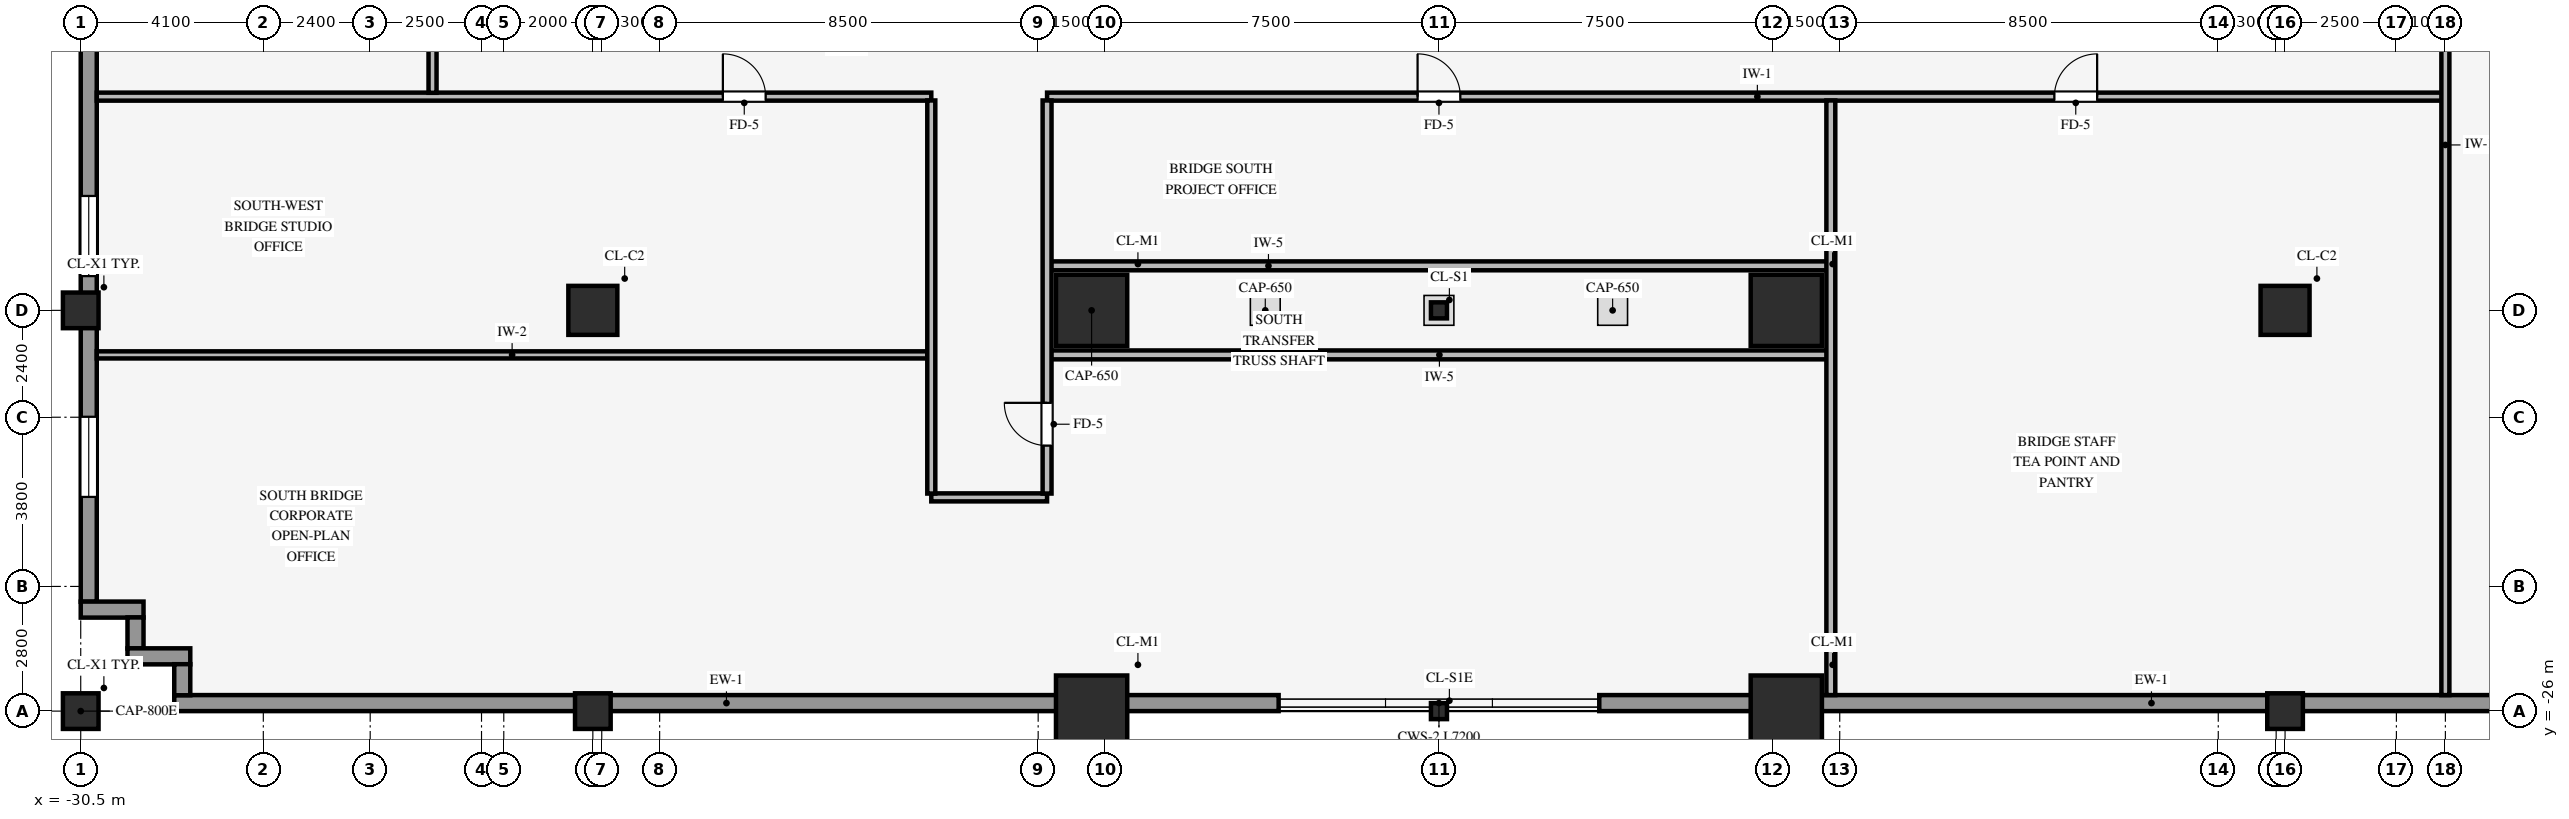
"""IFC4 building model, lengths in metres.
Left out: names, types, materials, properties, quantities, classifications, styles, units other than length and angle.
Written with IfcOpenShell. Run it as: python <this file> out.ifc"""

import sys

from ifc_helpers import new_model, si_unit, direction, frame, frame_2d, origin, origin_2d, place, context, subcontext, project, spatial, rectangle, hollow_rectangle, i_section, extrude, source, transform, mapped, element, fill, save


model = new_model("IFC4")
c1 = context("Model", 3, precision=1e-05, world=origin(), true_north=direction((0.0, 1.0)))
c2 = subcontext(c1, "Body", "Model", "MODEL_VIEW")
j1 = project(units=[si_unit("LENGTHUNIT", "METRE"), si_unit("PLANEANGLEUNIT", "RADIAN")], contexts=[c1])
p1 = place(None, origin())
s1 = spatial("IfcSite", under=j1, at=p1, CompositionType="ELEMENT")
p2 = place(p1, origin())
s2 = spatial("IfcBuilding", under=s1, at=p2, CompositionType="ELEMENT")
p3 = place(p2, frame((0.0, 0.0, 18.4)))
s3 = spatial("IfcBuildingStorey", under=s2, at=p3, CompositionType="ELEMENT", Elevation=18.4)
for number, where, z_axis, x_axis in (
    (1, (-7.8, -26.0, 0.0), (0.0, 0.0, 1.0), (1.0, 0.0, 0.0)),
    (2, (-7.8, -17.0, 0.0), (0.0, 0.0, 1.0), (1.0, 0.0, 0.0)),
    (3, (7.8, -26.0, 0.0), (0.0, 0.0, 1.0), (1.0, 0.0, 0.0)),
    (4, (7.8, -17.0, 0.0), (0.0, 0.0, 1.0), (1.0, 0.0, 0.0)),
):
    element("IfcColumn", number, at=place(p3, frame(where, z_axis=z_axis, x_axis=x_axis)), inside=s3, PredefinedType="COLUMN", context=c2, shape_type="SweptSolid", body=[
        extrude(rectangle(XDim=1.6, YDim=1.6, at=origin_2d()), origin(), (0.0, 0.0, 1.0), 4.2),
    ])
p4 = place(p3, frame((-30.5, -26.0, -0.4), z_axis=(0.0, 0.0, 1.0), x_axis=(1.0, 0.0, 0.0)))
e5 = element("IfcColumn", 5, at=p4, inside=s3, PredefinedType="COLUMN", context=c2, shape_type="SweptSolid", body=[
    extrude(hollow_rectangle(XDim=0.8, YDim=0.8, WallThickness=0.055, InnerFilletRadius=0.055, OuterFilletRadius=0.11, at=origin_2d()), origin(), (0.0, 0.0, 1.0), 4.6),
])
for number, where, z_axis, x_axis in (
    (6, (-30.5, -17.0, 0.0), (0.0, 0.0, 1.0), (1.0, 0.0, 0.0)),
    (7, (-19.0, -26.0, 0.0), (0.0, 0.0, 1.0), (1.0, 0.0, 0.0)),
):
    element("IfcColumn", number, at=place(p3, frame(where, z_axis=z_axis, x_axis=x_axis)), inside=s3, PredefinedType="COLUMN", context=c2, shape_type="SweptSolid", body=[
        extrude(hollow_rectangle(XDim=0.8, YDim=0.8, WallThickness=0.055, InnerFilletRadius=0.055, OuterFilletRadius=0.11, at=origin_2d()), origin(), (0.0, 0.0, 1.0), 4.2),
    ])
p5 = place(p3, frame((-19.0, -17.0, 0.0), z_axis=(0.0, 0.0, 1.0), x_axis=(1.0, 0.0, 0.0)))
e8 = element("IfcColumn", 8, at=p5, inside=s3, PredefinedType="COLUMN", context=c2, shape_type="SweptSolid", body=[
    extrude(rectangle(XDim=1.1, YDim=1.1, at=origin_2d()), origin(), (0.0, 0.0, 1.0), 4.2),
])
p6 = place(p3, frame((19.0, -26.0, 0.0), z_axis=(0.0, 0.0, 1.0), x_axis=(1.0, 0.0, 0.0)))
e9 = element("IfcColumn", 9, at=p6, inside=s3, PredefinedType="COLUMN", context=c2, shape_type="SweptSolid", body=[
    extrude(hollow_rectangle(XDim=0.8, YDim=0.8, WallThickness=0.055, InnerFilletRadius=0.055, OuterFilletRadius=0.11, at=origin_2d()), origin(), (0.0, 0.0, 1.0), 4.2),
])
p7 = place(p3, frame((19.0, -17.0, 0.0), z_axis=(0.0, 0.0, 1.0), x_axis=(1.0, 0.0, 0.0)))
e10 = element("IfcColumn", 10, at=p7, inside=s3, PredefinedType="COLUMN", context=c2, shape_type="SweptSolid", body=[
    extrude(rectangle(XDim=1.1, YDim=1.1, at=origin_2d()), origin(), (0.0, 0.0, 1.0), 4.2),
])
for number, where, z_axis, x_axis in (
    (11, (0.0, -26.0, -0.4), (0.0, 0.0, 1.0), (1.0, 0.0, 0.0)),
    (12, (0.0, -17.0, -0.4), (0.0, 0.0, 1.0), (1.0, 0.0, 0.0)),
):
    element("IfcColumn", number, at=place(p3, frame(where, z_axis=z_axis, x_axis=x_axis)), inside=s3, PredefinedType="COLUMN", context=c2, shape_type="SweptSolid", body=[
        extrude(i_section(OverallWidth=0.36, OverallDepth=0.36, WebThickness=0.021, FlangeThickness=0.021, FilletRadius=0.018, at=origin_2d()), origin(), (0.0, 0.0, 1.0), 4.6),
    ])
for number, where, z_axis, x_axis in (
    (13, (-28.4, -25.82, 0.0), (0.0, 0.0, 1.0), (1.0, 0.0, 0.0)),
    (14, (3.6, -25.82, 0.0), (0.0, 0.0, 1.0), (1.0, 0.0, 0.0)),
):
    element("IfcWall", number, at=place(p3, frame(where, z_axis=z_axis, x_axis=x_axis)), inside=s3, PredefinedType="STANDARD", context=c2, shape_type="SweptSolid", body=[
        extrude(rectangle(XDim=24.8, YDim=0.36, at=frame_2d((12.4, 0.0))), origin(), (0.0, 0.0, 1.0), 2.585),
    ])
p8 = place(p3, frame((-30.32, -23.544, 0.0), z_axis=(0.0, 0.0, 1.0), x_axis=(0.0, 1.0, 0.0)))
e15 = element("IfcWall", 15, at=p8, inside=s3, PredefinedType="STANDARD", context=c2, shape_type="SweptSolid", body=[
    extrude(rectangle(XDim=47.088, YDim=0.36, at=frame_2d((23.544, 0.0))), origin(), (0.0, 0.0, 1.0), 3.535),
])
p9 = place(p8, frame((2.354, 0.0, 0.85)))
e16 = element("IfcOpeningElement", 16, at=p9, cuts=e15, PredefinedType="OPENING", context=c2, shape_type="SweptSolid", body=[
    extrude(rectangle(XDim=1.8, YDim=2.35, at=frame_2d((0.9, 1.175))), frame((0.0, 0.19, 0.0), z_axis=(0.0, -1.0, 0.0), x_axis=(1.0, 0.0, 0.0)), (0.0, 0.0, 1.0), 0.38),
])
p10 = place(p8, frame((7.313, 0.0, 0.85)))
e17 = element("IfcOpeningElement", 17, at=p10, cuts=e15, PredefinedType="OPENING", context=c2, shape_type="SweptSolid", body=[
    extrude(rectangle(XDim=1.8, YDim=2.35, at=frame_2d((0.9, 1.175))), frame((0.0, 0.19, 0.0), z_axis=(0.0, -1.0, 0.0), x_axis=(1.0, 0.0, 0.0)), (0.0, 0.0, 1.0), 0.38),
])
p11 = place(p8, frame((15.881, 0.0, 0.85)))
e18 = element("IfcOpeningElement", 18, at=p11, cuts=e15, PredefinedType="OPENING", context=c2, shape_type="SweptSolid", body=[
    extrude(rectangle(XDim=1.8, YDim=2.35, at=frame_2d((0.9, 1.175))), frame((0.0, 0.19, 0.0), z_axis=(0.0, -1.0, 0.0), x_axis=(1.0, 0.0, 0.0)), (0.0, 0.0, 1.0), 0.38),
])
p12 = place(p8, frame((20.39, 0.0, 0.85)))
e19 = element("IfcOpeningElement", 19, at=p12, cuts=e15, PredefinedType="OPENING", context=c2, shape_type="SweptSolid", body=[
    extrude(rectangle(XDim=1.8, YDim=2.35, at=frame_2d((0.9, 1.175))), frame((0.0, 0.19, 0.0), z_axis=(0.0, -1.0, 0.0), x_axis=(1.0, 0.0, 0.0)), (0.0, 0.0, 1.0), 0.38),
])
p13 = place(p8, frame((24.898, 0.0, 0.85)))
e20 = element("IfcOpeningElement", 20, at=p13, cuts=e15, PredefinedType="OPENING", context=c2, shape_type="SweptSolid", body=[
    extrude(rectangle(XDim=1.8, YDim=2.35, at=frame_2d((0.9, 1.175))), frame((0.0, 0.19, 0.0), z_axis=(0.0, -1.0, 0.0), x_axis=(1.0, 0.0, 0.0)), (0.0, 0.0, 1.0), 0.38),
])
p14 = place(p8, frame((29.407, 0.0, 0.85)))
e21 = element("IfcOpeningElement", 21, at=p14, cuts=e15, PredefinedType="OPENING", context=c2, shape_type="SweptSolid", body=[
    extrude(rectangle(XDim=1.8, YDim=2.35, at=frame_2d((0.9, 1.175))), frame((0.0, 0.19, 0.0), z_axis=(0.0, -1.0, 0.0), x_axis=(1.0, 0.0, 0.0)), (0.0, 0.0, 1.0), 0.38),
])
p15 = place(p8, frame((37.975, 0.0, 0.85)))
e22 = element("IfcOpeningElement", 22, at=p15, cuts=e15, PredefinedType="OPENING", context=c2, shape_type="SweptSolid", body=[
    extrude(rectangle(XDim=1.8, YDim=2.35, at=frame_2d((0.9, 1.175))), frame((0.0, 0.19, 0.0), z_axis=(0.0, -1.0, 0.0), x_axis=(1.0, 0.0, 0.0)), (0.0, 0.0, 1.0), 0.38),
])
p16 = place(p8, frame((42.934, 0.0, 0.85)))
e23 = element("IfcOpeningElement", 23, at=p16, cuts=e15, PredefinedType="OPENING", context=c2, shape_type="SweptSolid", body=[
    extrude(rectangle(XDim=1.8, YDim=2.35, at=frame_2d((0.9, 1.175))), frame((0.0, 0.19, 0.0), z_axis=(0.0, -1.0, 0.0), x_axis=(1.0, 0.0, 0.0)), (0.0, 0.0, 1.0), 0.38),
])
p17 = place(p3, frame((-30.5, -23.72, 0.0), z_axis=(0.0, 0.0, 1.0), x_axis=(1.0, 0.0, 0.0)))
e24 = element("IfcWall", 24, at=p17, inside=s3, PredefinedType="STANDARD", context=c2, shape_type="SweptSolid", body=[
    extrude(rectangle(XDim=1.41, YDim=0.36, at=frame_2d((0.705, 0.0))), origin(), (0.0, 0.0, 1.0), 4.19),
])
p18 = place(p3, frame((-29.27, -24.594, 0.0), z_axis=(0.0, 0.0, 1.0), x_axis=(0.0, 1.0, 0.0)))
e25 = element("IfcWall", 25, at=p18, inside=s3, PredefinedType="STANDARD", context=c2, shape_type="SweptSolid", body=[
    extrude(rectangle(XDim=0.698, YDim=0.36, at=frame_2d((0.349, 0.0))), origin(), (0.0, 0.0, 1.0), 4.19),
])
p19 = place(p3, frame((-29.45, -24.77, 0.0), z_axis=(0.0, 0.0, 1.0), x_axis=(1.0, 0.0, 0.0)))
e26 = element("IfcWall", 26, at=p19, inside=s3, PredefinedType="STANDARD", context=c2, shape_type="SweptSolid", body=[
    extrude(rectangle(XDim=1.41, YDim=0.36, at=frame_2d((0.705, 0.0))), origin(), (0.0, 0.0, 1.0), 4.19),
])
p20 = place(p3, frame((-28.22, -25.644, 0.0), z_axis=(0.0, 0.0, 1.0), x_axis=(0.0, 1.0, 0.0)))
e27 = element("IfcWall", 27, at=p20, inside=s3, PredefinedType="STANDARD", context=c2, shape_type="SweptSolid", body=[
    extrude(rectangle(XDim=0.698, YDim=0.36, at=frame_2d((0.349, 0.0))), origin(), (0.0, 0.0, 1.0), 4.19),
])
p21 = place(p3, frame((-11.4, -21.2, 0.0), z_axis=(0.0, 0.0, 1.0), x_axis=(1.0, 0.0, 0.0)))
e28 = element("IfcWall", 28, at=p21, inside=s3, PredefinedType="PARTITIONING", context=c2, shape_type="SweptSolid", body=[
    extrude(rectangle(XDim=2.6, YDim=0.18, at=frame_2d((1.3, 0.0))), origin(), (0.0, 0.0, 1.0), 3.772),
])
p22 = place(p3, frame((-30.14, -18.0, 0.0), z_axis=(0.0, 0.0, 1.0), x_axis=(1.0, 0.0, 0.0)))
e29 = element("IfcWall", 29, at=p22, inside=s3, PredefinedType="PARTITIONING", context=c2, shape_type="SweptSolid", body=[
    extrude(rectangle(XDim=18.654, YDim=0.16, at=frame_2d((9.327, 0.0))), origin(), (0.0, 0.0, 1.0), 4.19),
])
for number, where, z_axis, x_axis in (
    (30, (-8.714, -18.0, 0.0), (0.0, 0.0, 1.0), (1.0, 0.0, 0.0)),
    (31, (-8.714, -16.0, 0.0), (0.0, 0.0, 1.0), (1.0, 0.0, 0.0)),
):
    element("IfcWall", number, at=place(p3, frame(where, z_axis=z_axis, x_axis=x_axis)), inside=s3, PredefinedType="STANDARD", context=c2, shape_type="SweptSolid", body=[
        extrude(rectangle(XDim=17.448, YDim=0.2, at=frame_2d((8.724, 0.0))), origin(), (0.0, 0.0, 1.0), 4.19),
    ])
p23 = place(p3, frame((-30.14, -12.2, 0.0), z_axis=(0.0, 0.0, 1.0), x_axis=(1.0, 0.0, 0.0)))
e32 = element("IfcWall", 32, at=p23, inside=s3, PredefinedType="PARTITIONING", context=c2, shape_type="SweptSolid", body=[
    extrude(rectangle(XDim=18.74, YDim=0.18, at=frame_2d((9.37, 0.0))), origin(), (0.0, 0.0, 1.0), 4.19),
])
p24 = place(p23, frame((14.06, 0.0, 0.0)))
e33 = element("IfcOpeningElement", 33, at=p24, cuts=e32, PredefinedType="OPENING", context=c2, shape_type="SweptSolid", body=[
    extrude(rectangle(XDim=0.96, YDim=2.1, at=frame_2d((0.48, 1.05))), frame((0.0, 0.1, 0.0), z_axis=(0.0, -1.0, 0.0), x_axis=(1.0, 0.0, 0.0)), (0.0, 0.0, 1.0), 0.2),
])
p25 = place(p3, frame((-8.8, -12.2, 0.0), z_axis=(0.0, 0.0, 1.0), x_axis=(1.0, 0.0, 0.0)))
e34 = element("IfcWall", 34, at=p25, inside=s3, PredefinedType="PARTITIONING", context=c2, shape_type="SweptSolid", body=[
    extrude(rectangle(XDim=31.334, YDim=0.18, at=frame_2d((15.667, 0.0))), origin(), (0.0, 0.0, 1.0), 4.19),
])
p26 = place(p25, frame((8.32, 0.0, 0.0)))
e35 = element("IfcOpeningElement", 35, at=p26, cuts=e34, PredefinedType="OPENING", context=c2, shape_type="SweptSolid", body=[
    extrude(rectangle(XDim=0.96, YDim=2.1, at=frame_2d((0.48, 1.05))), frame((0.0, 0.1, 0.0), z_axis=(0.0, -1.0, 0.0), x_axis=(1.0, 0.0, 0.0)), (0.0, 0.0, 1.0), 0.2),
])
p27 = place(p25, frame((22.62, 0.0, 0.0)))
e36 = element("IfcOpeningElement", 36, at=p27, cuts=e34, PredefinedType="OPENING", context=c2, shape_type="SweptSolid", body=[
    extrude(rectangle(XDim=0.96, YDim=2.1, at=frame_2d((0.48, 1.05))), frame((0.0, 0.1, 0.0), z_axis=(0.0, -1.0, 0.0), x_axis=(1.0, 0.0, 0.0)), (0.0, 0.0, 1.0), 0.2),
])
p28 = place(p3, frame((-22.6, -12.114, 0.0), z_axis=(0.0, 0.0, 1.0), x_axis=(0.0, 1.0, 0.0)))
e37 = element("IfcWall", 37, at=p28, inside=s3, PredefinedType="PARTITIONING", context=c2, shape_type="SweptSolid", body=[
    extrude(rectangle(XDim=24.228, YDim=0.18, at=frame_2d((12.114, 0.0))), origin(), (0.0, 0.0, 1.0), 4.19),
])
p29 = place(p28, frame((11.634, 0.0, 0.0)))
e38 = element("IfcOpeningElement", 38, at=p29, cuts=e37, PredefinedType="OPENING", context=c2, shape_type="SweptSolid", body=[
    extrude(rectangle(XDim=0.96, YDim=2.1, at=frame_2d((0.48, 1.05))), frame((0.0, 0.1, 0.0), z_axis=(0.0, -1.0, 0.0), x_axis=(1.0, 0.0, 0.0)), (0.0, 0.0, 1.0), 0.2),
])
p30 = place(p3, frame((-11.4, -21.114, 0.0), z_axis=(0.0, 0.0, 1.0), x_axis=(0.0, 1.0, 0.0)))
e39 = element("IfcWall", 39, at=p30, inside=s3, PredefinedType="PARTITIONING", context=c2, shape_type="SweptSolid", body=[
    extrude(rectangle(XDim=8.828, YDim=0.18, at=frame_2d((4.414, 0.0))), origin(), (0.0, 0.0, 1.0), 4.19),
])
p31 = place(p3, frame((-8.8, -21.114, 0.0), z_axis=(0.0, 0.0, 1.0), x_axis=(0.0, 1.0, 0.0)))
e40 = element("IfcWall", 40, at=p31, inside=s3, PredefinedType="STANDARD", context=c2, shape_type="SweptSolid", body=[
    extrude(rectangle(XDim=8.828, YDim=0.2, at=frame_2d((4.414, 0.0))), origin(), (0.0, 0.0, 1.0), 4.19),
])
p32 = place(p31, frame((1.077, 0.0, 0.0)))
e41 = element("IfcOpeningElement", 41, at=p32, cuts=e40, PredefinedType="OPENING", context=c2, shape_type="SweptSolid", body=[
    extrude(rectangle(XDim=0.96, YDim=2.1, at=frame_2d((0.48, 1.05))), frame((0.0, 0.11, 0.0), z_axis=(0.0, -1.0, 0.0), x_axis=(1.0, 0.0, 0.0)), (0.0, 0.0, 1.0), 0.22),
])
p33 = place(p3, frame((8.8, -25.64, 0.0), z_axis=(0.0, 0.0, 1.0), x_axis=(0.0, 1.0, 0.0)))
e42 = element("IfcWall", 42, at=p33, inside=s3, PredefinedType="STANDARD", context=c2, shape_type="SweptSolid", body=[
    extrude(rectangle(XDim=13.354, YDim=0.2, at=frame_2d((6.677, 0.0))), origin(), (0.0, 0.0, 1.0), 4.19),
])
p34 = place(p3, frame((22.6, -25.64, 0.0), z_axis=(0.0, 0.0, 1.0), x_axis=(0.0, 1.0, 0.0)))
e43 = element("IfcWall", 43, at=p34, inside=s3, PredefinedType="PARTITIONING", context=c2, shape_type="SweptSolid", body=[
    extrude(rectangle(XDim=51.28, YDim=0.18, at=frame_2d((25.64, 0.0))), origin(), (0.0, 0.0, 1.0), 4.19),
])
p35 = place(p34, frame((25.16, 0.0, 0.0)))
e44 = element("IfcOpeningElement", 44, at=p35, cuts=e43, PredefinedType="OPENING", context=c2, shape_type="SweptSolid", body=[
    extrude(rectangle(XDim=0.96, YDim=2.1, at=frame_2d((0.48, 1.05))), frame((0.0, 0.1, 0.0), z_axis=(0.0, -1.0, 0.0), x_axis=(1.0, 0.0, 0.0)), (0.0, 0.0, 1.0), 0.2),
])
p36 = place(p34, frame((43.09, 0.0, 0.0)))
e45 = element("IfcOpeningElement", 45, at=p36, cuts=e43, PredefinedType="OPENING", context=c2, shape_type="SweptSolid", body=[
    extrude(rectangle(XDim=0.9, YDim=2.1, at=frame_2d((0.45, 1.05))), frame((0.0, 0.1, 0.0), z_axis=(0.0, -1.0, 0.0), x_axis=(1.0, 0.0, 0.0)), (0.0, 0.0, 1.0), 0.2),
])
p37 = place(p34, frame((38.89, 0.0, 0.0)))
e46 = element("IfcOpeningElement", 46, at=p37, cuts=e43, PredefinedType="OPENING", context=c2, shape_type="SweptSolid", body=[
    extrude(rectangle(XDim=0.9, YDim=2.1, at=frame_2d((0.45, 1.05))), frame((0.0, 0.1, 0.0), z_axis=(0.0, -1.0, 0.0), x_axis=(1.0, 0.0, 0.0)), (0.0, 0.0, 1.0), 0.2),
])
p38 = place(p34, frame((47.29, 0.0, 0.0)))
e47 = element("IfcOpeningElement", 47, at=p38, cuts=e43, PredefinedType="OPENING", context=c2, shape_type="SweptSolid", body=[
    extrude(rectangle(XDim=0.9, YDim=2.1, at=frame_2d((0.45, 1.05))), frame((0.0, 0.1, 0.0), z_axis=(0.0, -1.0, 0.0), x_axis=(1.0, 0.0, 0.0)), (0.0, 0.0, 1.0), 0.2),
])
m1 = source(origin(), c2, "Body", "SweptSolid", [
    extrude(rectangle(XDim=1.8, YDim=2.35, at=frame_2d((0.9, 1.175))), frame((0.0, 0.03, 0.0), z_axis=(0.0, -1.0, 0.0), x_axis=(1.0, 0.0, 0.0)), (0.0, 0.0, 1.0), 0.06),
])
p39 = place(p9, origin())
e48 = element("IfcWindow", 48, at=p39, inside=s3, PartitioningType="SINGLE_PANEL", PredefinedType="WINDOW", context=c2, shape_type="MappedRepresentation", body=[
    mapped(m1, transform((0.0, 0.0, 0.0), scale=1.0)),
])
fill(e16, e48)
p40 = place(p10, origin())
e49 = element("IfcWindow", 49, at=p40, inside=s3, PartitioningType="SINGLE_PANEL", PredefinedType="WINDOW", context=c2, shape_type="MappedRepresentation", body=[
    mapped(m1, transform((0.0, 0.0, 0.0), scale=1.0)),
])
fill(e17, e49)
m2 = source(origin(), c2, "Body", "SweptSolid", [
    extrude(rectangle(XDim=0.96, YDim=2.1, at=frame_2d((0.48, 1.05))), frame((0.0, 0.025, 0.0), z_axis=(0.0, -1.0, 0.0), x_axis=(1.0, 0.0, 0.0)), (0.0, 0.0, 1.0), 0.05),
])
p41 = place(p26, origin())
e50 = element("IfcDoor", 50, at=p41, inside=s3, OperationType="SINGLE_SWING_LEFT", PredefinedType="DOOR", context=c2, shape_type="MappedRepresentation", body=[
    mapped(m2, transform((0.0, 0.0, 0.0), scale=1.0)),
])
fill(e35, e50)
p42 = place(p27, origin())
e51 = element("IfcDoor", 51, at=p42, inside=s3, OperationType="SINGLE_SWING_RIGHT", PredefinedType="DOOR", context=c2, shape_type="MappedRepresentation", body=[
    mapped(m2, transform((0.0, 0.0, 0.0), scale=1.0)),
])
fill(e36, e51)
p43 = place(p24, origin())
e52 = element("IfcDoor", 52, at=p43, inside=s3, OperationType="SINGLE_SWING_LEFT", PredefinedType="DOOR", context=c2, shape_type="MappedRepresentation", body=[
    mapped(m2, transform((0.0, 0.0, 0.0), scale=1.0)),
])
fill(e33, e52)
p44 = place(p32, origin())
e53 = element("IfcDoor", 53, at=p44, inside=s3, OperationType="SINGLE_SWING_RIGHT", PredefinedType="DOOR", context=c2, shape_type="MappedRepresentation", body=[
    mapped(m2, transform((0.0, 0.0, 0.0), scale=1.0)),
])
fill(e41, e53)
save(model, sys.argv[1])
